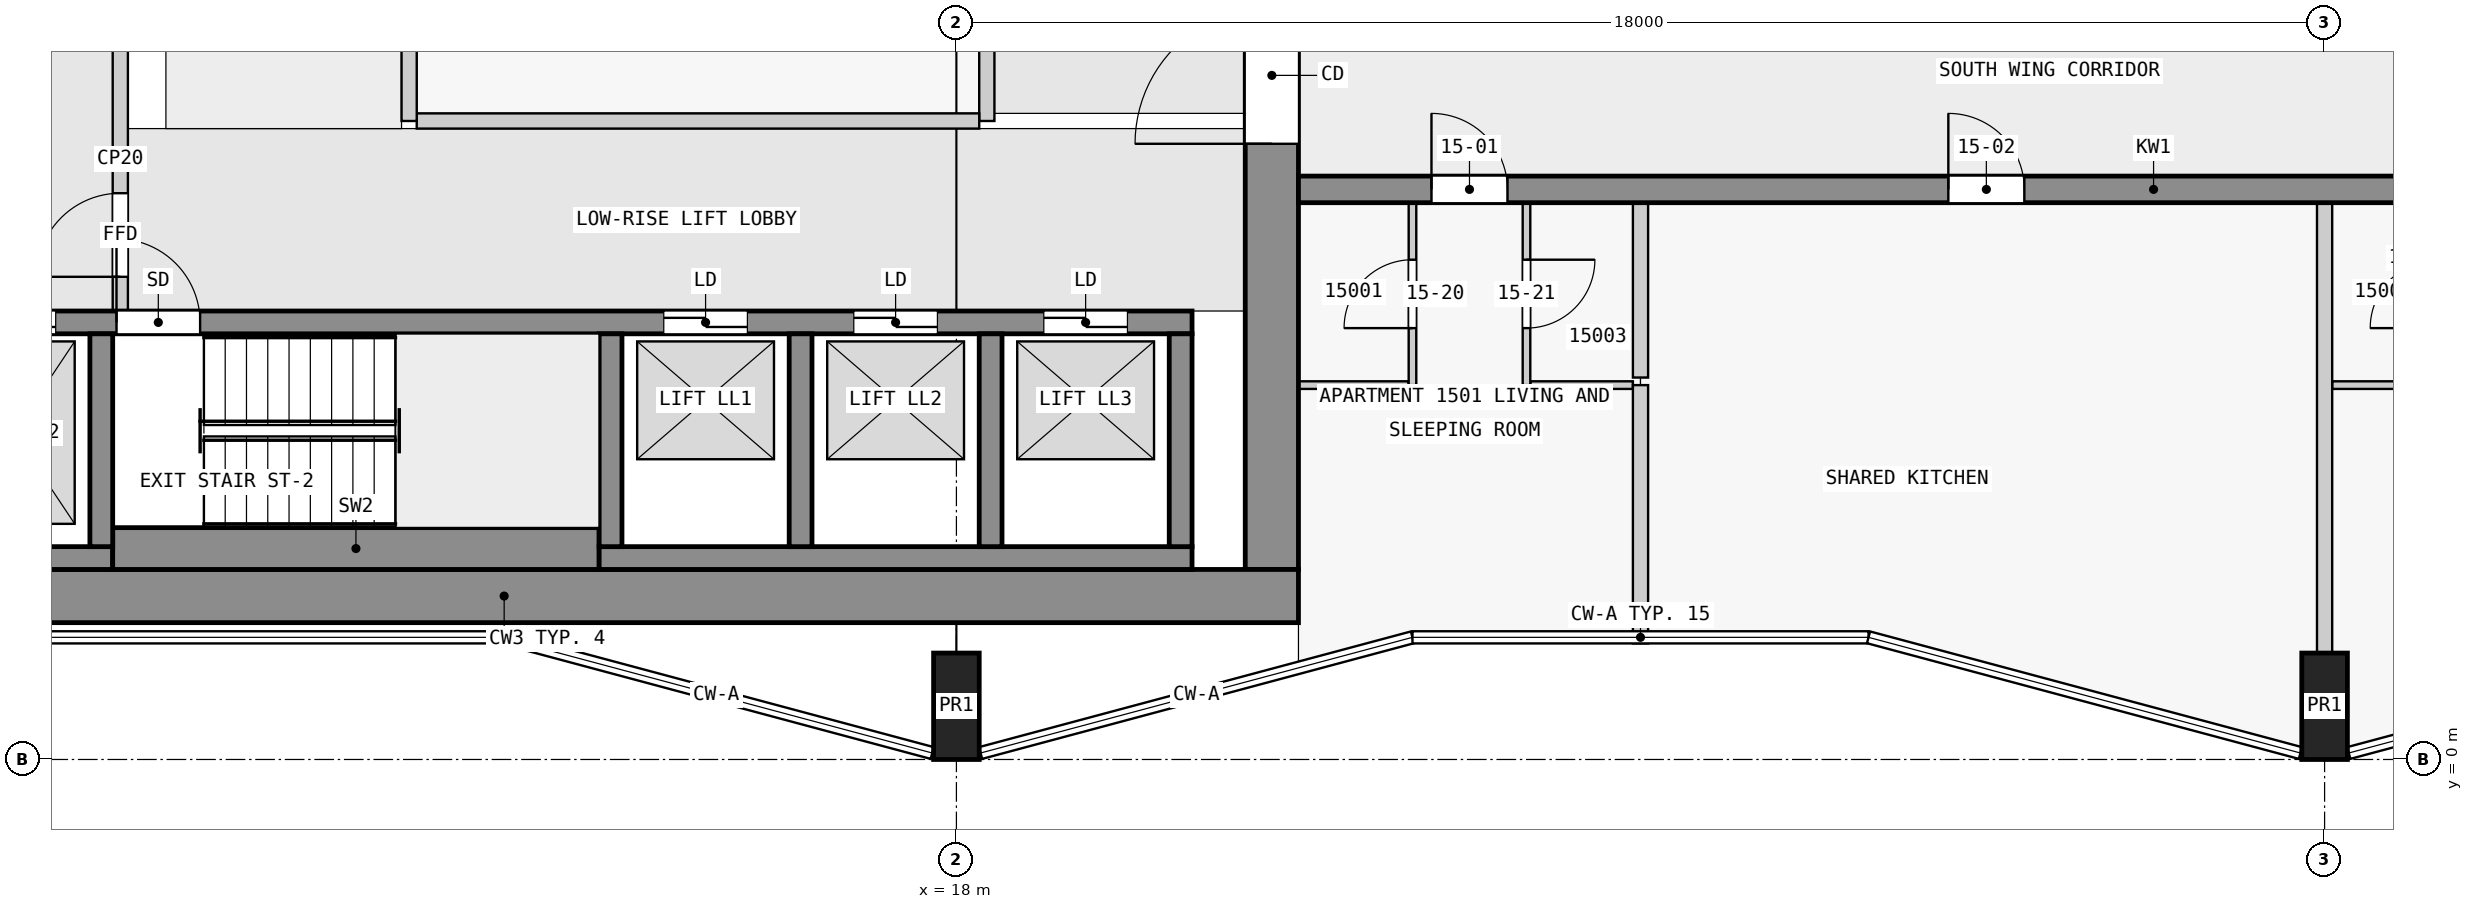
"""IFC4 building model, lengths in metres.
Left out: names, types, materials, properties, quantities, classifications, styles, units other than length and angle.
Written with IfcOpenShell. Run it as: python <this file> out.ifc"""

import sys

from ifc_helpers import new_model, si_unit, direction, frame, frame_2d, origin, origin_2d, place, context, subcontext, project, spatial, rectangle, extrude, element, fill, save


model = new_model("IFC4")
c1 = context("Model", 3, precision=1e-05, world=origin(), true_north=direction((0.0, 1.0)))
c2 = subcontext(c1, "Body", "Model", "MODEL_VIEW")
j1 = project(units=[si_unit("LENGTHUNIT", "METRE"), si_unit("PLANEANGLEUNIT", "RADIAN")], contexts=[c1])
p1 = place(None, origin())
s1 = spatial("IfcSite", under=j1, at=p1, CompositionType="ELEMENT")
p2 = place(p1, origin())
s2 = spatial("IfcBuilding", under=s1, at=p2, CompositionType="ELEMENT")
p3 = place(p2, frame((0.0, 0.0, 61.8)))
s3 = spatial("IfcBuildingStorey", under=s2, at=p3, CompositionType="ELEMENT", Elevation=61.8)
for number, where, z_axis, x_axis in (
    (1, (18.0, 0.7, 0.0), (0.0, 0.0, 1.0), (1.0, 0.0, 0.0)),
    (2, (36.0, 0.7, 0.0), (0.0, 0.0, 1.0), (1.0, 0.0, 0.0)),
):
    element("IfcColumn", number, at=place(p3, frame(where, z_axis=z_axis, x_axis=x_axis)), inside=s3, PredefinedType="COLUMN", context=c2, shape_type="SweptSolid", body=[
        extrude(rectangle(XDim=0.6, YDim=1.4, at=origin_2d()), origin(), (0.0, 0.0, 1.0), 3.5),
    ])
p4 = place(p3, frame((1.6, 2.15, 0.0), z_axis=(0.0, 0.0, 1.0), x_axis=(1.0, 0.0, 0.0)))
e3 = element("IfcWall", 3, at=p4, inside=s3, PredefinedType="SHEAR", context=c2, shape_type="SweptSolid", body=[
    extrude(rectangle(XDim=20.9, YDim=0.7, at=frame_2d((10.45, 0.0))), origin(), (0.0, 0.0, 1.0), 3.25),
])
p5 = place(p3, frame((22.15, 2.5, 0.0), z_axis=(0.0, 0.0, 1.0), x_axis=(0.0, 1.0, 0.0)))
e4 = element("IfcWall", 4, at=p5, inside=s3, PredefinedType="SHEAR", context=c2, shape_type="SweptSolid", body=[
    extrude(rectangle(XDim=14.8, YDim=0.7, at=frame_2d((7.4, 0.0))), origin(), (0.0, 0.0, 1.0), 3.25),
])
p6 = place(p5, frame((5.6, 0.0, 0.0)))
e5 = element("IfcOpeningElement", 5, at=p6, cuts=e4, PredefinedType="OPENING", context=c2, shape_type="SweptSolid", body=[
    extrude(rectangle(XDim=1.8, YDim=2.1, at=frame_2d((0.9, 1.05))), frame((0.0, 0.36, 0.0), z_axis=(0.0, -1.0, 0.0), x_axis=(1.0, 0.0, 0.0)), (0.0, 0.0, 1.0), 0.72),
])
p7 = place(p3, frame((2.3, 2.65, 0.0), z_axis=(0.0, 0.0, 1.0), x_axis=(1.0, 0.0, 0.0)))
e6 = element("IfcWall", 6, at=p7, inside=s3, PredefinedType="SHEAR", context=c2, shape_type="SweptSolid", body=[
    extrude(rectangle(XDim=4.6, YDim=0.3, at=frame_2d((2.3, 0.0))), origin(), (0.0, 0.0, 1.0), 3.25),
])
p8 = place(p3, frame((6.9, 2.775, 0.0), z_axis=(0.0, 0.0, 1.0), x_axis=(1.0, 0.0, 0.0)))
e7 = element("IfcWall", 7, at=p8, inside=s3, PredefinedType="SHEAR", context=c2, shape_type="SweptSolid", body=[
    extrude(rectangle(XDim=6.4, YDim=0.55, at=frame_2d((3.2, 0.0))), origin(), (0.0, 0.0, 1.0), 3.25),
])
p9 = place(p3, frame((13.3, 2.65, 0.0), z_axis=(0.0, 0.0, 1.0), x_axis=(1.0, 0.0, 0.0)))
e8 = element("IfcWall", 8, at=p9, inside=s3, PredefinedType="SHEAR", context=c2, shape_type="SweptSolid", body=[
    extrude(rectangle(XDim=7.8, YDim=0.3, at=frame_2d((3.9, 0.0))), origin(), (0.0, 0.0, 1.0), 3.25),
])
for number, where, z_axis, x_axis in (
    (9, (6.75, 2.8, 0.0), (0.0, 0.0, 1.0), (0.0, 1.0, 0.0)),
    (10, (13.45, 2.8, 0.0), (0.0, 0.0, 1.0), (0.0, 1.0, 0.0)),
    (11, (15.95, 2.8, 0.0), (0.0, 0.0, 1.0), (0.0, 1.0, 0.0)),
    (12, (18.45, 2.8, 0.0), (0.0, 0.0, 1.0), (0.0, 1.0, 0.0)),
    (13, (20.95, 2.8, 0.0), (0.0, 0.0, 1.0), (0.0, 1.0, 0.0)),
):
    element("IfcWall", number, at=place(p3, frame(where, z_axis=z_axis, x_axis=x_axis)), inside=s3, PredefinedType="SHEAR", context=c2, shape_type="SweptSolid", body=[
        extrude(rectangle(XDim=2.8, YDim=0.3, at=frame_2d((1.4, 0.0))), origin(), (0.0, 0.0, 1.0), 3.25),
    ])
p10 = place(p3, frame((2.3, 5.75, 0.0), z_axis=(0.0, 0.0, 1.0), x_axis=(1.0, 0.0, 0.0)))
e14 = element("IfcWall", 14, at=p10, inside=s3, PredefinedType="SHEAR", context=c2, shape_type="SweptSolid", body=[
    extrude(rectangle(XDim=18.8, YDim=0.3, at=frame_2d((9.4, 0.0))), origin(), (0.0, 0.0, 1.0), 3.25),
])
p11 = place(p10, frame((4.65, 0.0, 0.0)))
e15 = element("IfcOpeningElement", 15, at=p11, cuts=e14, PredefinedType="OPENING", context=c2, shape_type="SweptSolid", body=[
    extrude(rectangle(XDim=1.1, YDim=2.1, at=frame_2d((0.55, 1.05))), frame((0.0, 0.16, 0.0), z_axis=(0.0, -1.0, 0.0), x_axis=(1.0, 0.0, 0.0)), (0.0, 0.0, 1.0), 0.32),
])
p12 = place(p10, frame((0.45, 0.0, 0.0)))
e16 = element("IfcOpeningElement", 16, at=p12, cuts=e14, PredefinedType="OPENING", context=c2, shape_type="SweptSolid", body=[
    extrude(rectangle(XDim=1.1, YDim=2.1, at=frame_2d((0.55, 1.05))), frame((0.0, 0.16, 0.0), z_axis=(0.0, -1.0, 0.0), x_axis=(1.0, 0.0, 0.0)), (0.0, 0.0, 1.0), 0.32),
])
p13 = place(p10, frame((2.75, 0.0, 0.0)))
e17 = element("IfcOpeningElement", 17, at=p13, cuts=e14, PredefinedType="OPENING", context=c2, shape_type="SweptSolid", body=[
    extrude(rectangle(XDim=1.1, YDim=2.1, at=frame_2d((0.55, 1.05))), frame((0.0, 0.16, 0.0), z_axis=(0.0, -1.0, 0.0), x_axis=(1.0, 0.0, 0.0)), (0.0, 0.0, 1.0), 0.32),
])
p14 = place(p10, frame((11.85, 0.0, 0.0)))
e18 = element("IfcOpeningElement", 18, at=p14, cuts=e14, PredefinedType="OPENING", context=c2, shape_type="SweptSolid", body=[
    extrude(rectangle(XDim=1.1, YDim=2.1, at=frame_2d((0.55, 1.05))), frame((0.0, 0.16, 0.0), z_axis=(0.0, -1.0, 0.0), x_axis=(1.0, 0.0, 0.0)), (0.0, 0.0, 1.0), 0.32),
])
p15 = place(p10, frame((14.35, 0.0, 0.0)))
e19 = element("IfcOpeningElement", 19, at=p15, cuts=e14, PredefinedType="OPENING", context=c2, shape_type="SweptSolid", body=[
    extrude(rectangle(XDim=1.1, YDim=2.1, at=frame_2d((0.55, 1.05))), frame((0.0, 0.16, 0.0), z_axis=(0.0, -1.0, 0.0), x_axis=(1.0, 0.0, 0.0)), (0.0, 0.0, 1.0), 0.32),
])
p16 = place(p10, frame((16.85, 0.0, 0.0)))
e20 = element("IfcOpeningElement", 20, at=p16, cuts=e14, PredefinedType="OPENING", context=c2, shape_type="SweptSolid", body=[
    extrude(rectangle(XDim=1.1, YDim=2.1, at=frame_2d((0.55, 1.05))), frame((0.0, 0.16, 0.0), z_axis=(0.0, -1.0, 0.0), x_axis=(1.0, 0.0, 0.0)), (0.0, 0.0, 1.0), 0.32),
])
p17 = place(p3, frame((22.5, 7.5, 0.0), z_axis=(0.0, 0.0, 1.0), x_axis=(1.0, 0.0, 0.0)))
e21 = element("IfcWall", 21, at=p17, inside=s3, PredefinedType="SHEAR", context=c2, shape_type="SweptSolid", body=[
    extrude(rectangle(XDim=22.5, YDim=0.35, at=frame_2d((11.25, 0.0))), origin(), (0.0, 0.0, 1.0), 3.25),
])
p18 = place(p17, frame((1.75, 0.0, 0.0)))
e22 = element("IfcOpeningElement", 22, at=p18, cuts=e21, PredefinedType="OPENING", context=c2, shape_type="SweptSolid", body=[
    extrude(rectangle(XDim=1.0, YDim=2.1, at=frame_2d((0.5, 1.05))), frame((0.0, 0.185, 0.0), z_axis=(0.0, -1.0, 0.0), x_axis=(1.0, 0.0, 0.0)), (0.0, 0.0, 1.0), 0.37),
])
p19 = place(p17, frame((8.55, 0.0, 0.0)))
e23 = element("IfcOpeningElement", 23, at=p19, cuts=e21, PredefinedType="OPENING", context=c2, shape_type="SweptSolid", body=[
    extrude(rectangle(XDim=1.0, YDim=2.1, at=frame_2d((0.5, 1.05))), frame((0.0, 0.185, 0.0), z_axis=(0.0, -1.0, 0.0), x_axis=(1.0, 0.0, 0.0)), (0.0, 0.0, 1.0), 0.37),
])
p20 = place(p17, frame((15.25, 0.0, 0.0)))
e24 = element("IfcOpeningElement", 24, at=p20, cuts=e21, PredefinedType="OPENING", context=c2, shape_type="SweptSolid", body=[
    extrude(rectangle(XDim=1.0, YDim=2.1, at=frame_2d((0.5, 1.05))), frame((0.0, 0.185, 0.0), z_axis=(0.0, -1.0, 0.0), x_axis=(1.0, 0.0, 0.0)), (0.0, 0.0, 1.0), 0.37),
])
p21 = place(p17, frame((18.75, 0.0, 0.0)))
e25 = element("IfcOpeningElement", 25, at=p21, cuts=e21, PredefinedType="OPENING", context=c2, shape_type="SweptSolid", body=[
    extrude(rectangle(XDim=0.9, YDim=2.1, at=frame_2d((0.45, 1.05))), frame((0.0, 0.185, 0.0), z_axis=(0.0, -1.0, 0.0), x_axis=(1.0, 0.0, 0.0)), (0.0, 0.0, 1.0), 0.37),
])
p22 = place(p17, frame((20.95, 0.0, 0.0)))
e26 = element("IfcOpeningElement", 26, at=p22, cuts=e21, PredefinedType="OPENING", context=c2, shape_type="SweptSolid", body=[
    extrude(rectangle(XDim=1.0, YDim=2.1, at=frame_2d((0.5, 1.05))), frame((0.0, 0.185, 0.0), z_axis=(0.0, -1.0, 0.0), x_axis=(1.0, 0.0, 0.0)), (0.0, 0.0, 1.0), 0.37),
])
p23 = place(p3, frame((7.0, 5.9, 0.0), z_axis=(0.0, 0.0, 1.0), x_axis=(0.0, 1.0, 0.0)))
e27 = element("IfcWall", 27, at=p23, inside=s3, PredefinedType="PARTITIONING", context=c2, shape_type="SweptSolid", body=[
    extrude(rectangle(XDim=4.0, YDim=0.2, at=frame_2d((2.0, 0.0))), origin(), (0.0, 0.0, 1.0), 3.25),
])
p24 = place(p23, frame((0.45, 0.0, 0.0)))
e28 = element("IfcOpeningElement", 28, at=p24, cuts=e27, PredefinedType="OPENING", context=c2, shape_type="SweptSolid", body=[
    extrude(rectangle(XDim=1.1, YDim=2.1, at=frame_2d((0.55, 1.05))), frame((0.0, 0.11, 0.0), z_axis=(0.0, -1.0, 0.0), x_axis=(1.0, 0.0, 0.0)), (0.0, 0.0, 1.0), 0.22),
])
p25 = place(p3, frame((10.8, 8.4, 0.0), z_axis=(0.0, 0.0, 1.0), x_axis=(0.0, 1.0, 0.0)))
e29 = element("IfcWall", 29, at=p25, inside=s3, PredefinedType="PARTITIONING", context=c2, shape_type="SweptSolid", body=[
    extrude(rectangle(XDim=6.2, YDim=0.2, at=frame_2d((3.1, 0.0))), origin(), (0.0, 0.0, 1.0), 3.25),
])
p26 = place(p3, frame((10.9, 8.4, 0.0), z_axis=(0.0, 0.0, 1.0), x_axis=(1.0, 0.0, 0.0)))
e30 = element("IfcWall", 30, at=p26, inside=s3, PredefinedType="PARTITIONING", context=c2, shape_type="SweptSolid", body=[
    extrude(rectangle(XDim=7.4, YDim=0.2, at=frame_2d((3.7, 0.0))), origin(), (0.0, 0.0, 1.0), 3.25),
])
p27 = place(p3, frame((18.4, 8.4, 0.0), z_axis=(0.0, 0.0, 1.0), x_axis=(0.0, 1.0, 0.0)))
e31 = element("IfcWall", 31, at=p27, inside=s3, PredefinedType="PARTITIONING", context=c2, shape_type="SweptSolid", body=[
    extrude(rectangle(XDim=6.2, YDim=0.2, at=frame_2d((3.1, 0.0))), origin(), (0.0, 0.0, 1.0), 3.25),
])
p28 = place(p27, frame((0.95, 0.0, 0.0)))
e32 = element("IfcOpeningElement", 32, at=p28, cuts=e31, PredefinedType="OPENING", context=c2, shape_type="SweptSolid", body=[
    extrude(rectangle(XDim=0.9, YDim=2.1, at=frame_2d((0.45, 1.05))), frame((0.0, 0.11, 0.0), z_axis=(0.0, -1.0, 0.0), x_axis=(1.0, 0.0, 0.0)), (0.0, 0.0, 1.0), 0.22),
])
p29 = place(p27, frame((4.05, 0.0, 0.0)))
e33 = element("IfcOpeningElement", 33, at=p29, cuts=e31, PredefinedType="OPENING", context=c2, shape_type="SweptSolid", body=[
    extrude(rectangle(XDim=0.9, YDim=2.1, at=frame_2d((0.45, 1.05))), frame((0.0, 0.11, 0.0), z_axis=(0.0, -1.0, 0.0), x_axis=(1.0, 0.0, 0.0)), (0.0, 0.0, 1.0), 0.22),
])
p30 = place(p3, frame((22.5, 4.925, 0.0), z_axis=(0.0, 0.0, 1.0), x_axis=(1.0, 0.0, 0.0)))
e34 = element("IfcWall", 34, at=p30, inside=s3, PredefinedType="PARTITIONING", context=c2, shape_type="SweptSolid", body=[
    extrude(rectangle(XDim=1.45, YDim=0.1, at=frame_2d((0.725, 0.0))), origin(), (0.0, 0.0, 1.0), 3.25),
])
for number, where, z_axis, x_axis in (
    (35, (25.55, 4.925, 0.0), (0.0, 0.0, 1.0), (1.0, 0.0, 0.0)),
    (36, (36.1, 4.925, 0.0), (0.0, 0.0, 1.0), (1.0, 0.0, 0.0)),
):
    element("IfcWall", number, at=place(p3, frame(where, z_axis=z_axis, x_axis=x_axis)), inside=s3, PredefinedType="PARTITIONING", context=c2, shape_type="SweptSolid", body=[
        extrude(rectangle(XDim=1.35, YDim=0.1, at=frame_2d((0.675, 0.0))), origin(), (0.0, 0.0, 1.0), 3.25),
    ])
p31 = place(p3, frame((24.0, 4.925, 0.0), z_axis=(0.0, 0.0, 1.0), x_axis=(0.0, 1.0, 0.0)))
e37 = element("IfcWall", 37, at=p31, inside=s3, PredefinedType="PARTITIONING", context=c2, shape_type="SweptSolid", body=[
    extrude(rectangle(XDim=2.4, YDim=0.1, at=frame_2d((1.2, 0.0))), origin(), (0.0, 0.0, 1.0), 3.25),
])
p32 = place(p31, frame((0.75, 0.0, 0.0)))
e38 = element("IfcOpeningElement", 38, at=p32, cuts=e37, PredefinedType="OPENING", context=c2, shape_type="SweptSolid", body=[
    extrude(rectangle(XDim=0.9, YDim=2.1, at=frame_2d((0.45, 1.05))), frame((0.0, 0.06, 0.0), z_axis=(0.0, -1.0, 0.0), x_axis=(1.0, 0.0, 0.0)), (0.0, 0.0, 1.0), 0.12),
])
p33 = place(p3, frame((25.5, 7.325, 0.0), z_axis=(0.0, 0.0, 1.0), x_axis=(0.0, -1.0, 0.0)))
e39 = element("IfcWall", 39, at=p33, inside=s3, PredefinedType="PARTITIONING", context=c2, shape_type="SweptSolid", body=[
    extrude(rectangle(XDim=2.4, YDim=0.1, at=frame_2d((1.2, 0.0))), origin(), (0.0, 0.0, 1.0), 3.25),
])
p34 = place(p33, frame((0.75, 0.0, 0.0)))
e40 = element("IfcOpeningElement", 40, at=p34, cuts=e39, PredefinedType="OPENING", context=c2, shape_type="SweptSolid", body=[
    extrude(rectangle(XDim=0.9, YDim=2.1, at=frame_2d((0.45, 1.05))), frame((0.0, 0.06, 0.0), z_axis=(0.0, -1.0, 0.0), x_axis=(1.0, 0.0, 0.0)), (0.0, 0.0, 1.0), 0.12),
])
p35 = place(p3, frame((27.0, 4.925, 0.0), z_axis=(0.0, 0.0, 1.0), x_axis=(0.0, -1.0, 0.0)))
e41 = element("IfcWall", 41, at=p35, inside=s3, PredefinedType="PARTITIONING", context=c2, shape_type="SweptSolid", body=[
    extrude(rectangle(XDim=3.398, YDim=0.2, at=frame_2d((1.699, 0.0))), origin(), (0.0, 0.0, 1.0), 3.25),
])
p36 = place(p3, frame((27.0, 5.025, 0.0), z_axis=(0.0, 0.0, 1.0), x_axis=(0.0, 1.0, 0.0)))
e42 = element("IfcWall", 42, at=p36, inside=s3, PredefinedType="PARTITIONING", context=c2, shape_type="SweptSolid", body=[
    extrude(rectangle(XDim=2.3, YDim=0.2, at=frame_2d((1.15, 0.0))), origin(), (0.0, 0.0, 1.0), 3.25),
])
p37 = place(p3, frame((36.0, 1.4, 0.0), z_axis=(0.0, 0.0, 1.0), x_axis=(0.0, 1.0, 0.0)))
e43 = element("IfcWall", 43, at=p37, inside=s3, PredefinedType="PARTITIONING", context=c2, shape_type="SweptSolid", body=[
    extrude(rectangle(XDim=5.925, YDim=0.2, at=frame_2d((2.962, 0.0))), origin(), (0.0, 0.0, 1.0), 3.25),
])
p38 = place(p24, origin())
e44 = element("IfcDoor", 44, at=p38, inside=s3, OperationType="SINGLE_SWING_LEFT", PredefinedType="DOOR", context=c2, shape_type="SweptSolid", body=[
    extrude(rectangle(XDim=1.1, YDim=2.1, at=frame_2d((0.55, 1.05))), frame((0.0, 0.025, 0.0), z_axis=(0.0, -1.0, 0.0), x_axis=(1.0, 0.0, 0.0)), (0.0, 0.0, 1.0), 0.05),
])
fill(e28, e44)
p39 = place(p11, origin())
e45 = element("IfcDoor", 45, at=p39, inside=s3, OperationType="SINGLE_SWING_LEFT", PredefinedType="DOOR", context=c2, shape_type="SweptSolid", body=[
    extrude(rectangle(XDim=1.1, YDim=2.1, at=frame_2d((0.55, 1.05))), frame((0.0, 0.025, 0.0), z_axis=(0.0, -1.0, 0.0), x_axis=(1.0, 0.0, 0.0)), (0.0, 0.0, 1.0), 0.05),
])
fill(e15, e45)
p40 = place(p13, origin())
e46 = element("IfcDoor", 46, at=p40, inside=s3, OperationType="DOUBLE_DOOR_SLIDING", PredefinedType="DOOR", context=c2, shape_type="SweptSolid", body=[
    extrude(rectangle(XDim=1.1, YDim=2.1, at=frame_2d((0.55, 1.05))), frame((0.0, 0.025, 0.0), z_axis=(0.0, -1.0, 0.0), x_axis=(1.0, 0.0, 0.0)), (0.0, 0.0, 1.0), 0.05),
])
fill(e17, e46)
p41 = place(p14, origin())
e47 = element("IfcDoor", 47, at=p41, inside=s3, OperationType="DOUBLE_DOOR_SLIDING", PredefinedType="DOOR", context=c2, shape_type="SweptSolid", body=[
    extrude(rectangle(XDim=1.1, YDim=2.1, at=frame_2d((0.55, 1.05))), frame((0.0, 0.025, 0.0), z_axis=(0.0, -1.0, 0.0), x_axis=(1.0, 0.0, 0.0)), (0.0, 0.0, 1.0), 0.05),
])
fill(e18, e47)
p42 = place(p15, origin())
e48 = element("IfcDoor", 48, at=p42, inside=s3, OperationType="DOUBLE_DOOR_SLIDING", PredefinedType="DOOR", context=c2, shape_type="SweptSolid", body=[
    extrude(rectangle(XDim=1.1, YDim=2.1, at=frame_2d((0.55, 1.05))), frame((0.0, 0.025, 0.0), z_axis=(0.0, -1.0, 0.0), x_axis=(1.0, 0.0, 0.0)), (0.0, 0.0, 1.0), 0.05),
])
fill(e19, e48)
p43 = place(p16, origin())
e49 = element("IfcDoor", 49, at=p43, inside=s3, OperationType="DOUBLE_DOOR_SLIDING", PredefinedType="DOOR", context=c2, shape_type="SweptSolid", body=[
    extrude(rectangle(XDim=1.1, YDim=2.1, at=frame_2d((0.55, 1.05))), frame((0.0, 0.025, 0.0), z_axis=(0.0, -1.0, 0.0), x_axis=(1.0, 0.0, 0.0)), (0.0, 0.0, 1.0), 0.05),
])
fill(e20, e49)
p44 = place(p6, origin())
e50 = element("IfcDoor", 50, at=p44, inside=s3, OperationType="DOUBLE_DOOR_SINGLE_SWING", PredefinedType="DOOR", context=c2, shape_type="SweptSolid", body=[
    extrude(rectangle(XDim=1.8, YDim=2.1, at=frame_2d((0.9, 1.05))), frame((0.0, 0.025, 0.0), z_axis=(0.0, -1.0, 0.0), x_axis=(1.0, 0.0, 0.0)), (0.0, 0.0, 1.0), 0.05),
])
fill(e5, e50)
p45 = place(p18, origin())
e51 = element("IfcDoor", 51, at=p45, inside=s3, OperationType="SINGLE_SWING_LEFT", PredefinedType="DOOR", context=c2, shape_type="SweptSolid", body=[
    extrude(rectangle(XDim=1.0, YDim=2.1, at=frame_2d((0.5, 1.05))), frame((0.0, 0.025, 0.0), z_axis=(0.0, -1.0, 0.0), x_axis=(1.0, 0.0, 0.0)), (0.0, 0.0, 1.0), 0.05),
])
fill(e22, e51)
p46 = place(p19, origin())
e52 = element("IfcDoor", 52, at=p46, inside=s3, OperationType="SINGLE_SWING_LEFT", PredefinedType="DOOR", context=c2, shape_type="SweptSolid", body=[
    extrude(rectangle(XDim=1.0, YDim=2.1, at=frame_2d((0.5, 1.05))), frame((0.0, 0.025, 0.0), z_axis=(0.0, -1.0, 0.0), x_axis=(1.0, 0.0, 0.0)), (0.0, 0.0, 1.0), 0.05),
])
fill(e23, e52)
p47 = place(p32, origin())
e53 = element("IfcDoor", 53, at=p47, inside=s3, OperationType="SINGLE_SWING_LEFT", PredefinedType="DOOR", context=c2, shape_type="SweptSolid", body=[
    extrude(rectangle(XDim=0.9, YDim=2.1, at=frame_2d((0.45, 1.05))), frame((0.0, 0.025, 0.0), z_axis=(0.0, -1.0, 0.0), x_axis=(1.0, 0.0, 0.0)), (0.0, 0.0, 1.0), 0.05),
])
fill(e38, e53)
p48 = place(p34, origin())
e54 = element("IfcDoor", 54, at=p48, inside=s3, OperationType="SINGLE_SWING_LEFT", PredefinedType="DOOR", context=c2, shape_type="SweptSolid", body=[
    extrude(rectangle(XDim=0.9, YDim=2.1, at=frame_2d((0.45, 1.05))), frame((0.0, 0.025, 0.0), z_axis=(0.0, -1.0, 0.0), x_axis=(1.0, 0.0, 0.0)), (0.0, 0.0, 1.0), 0.05),
])
fill(e40, e54)
save(model, sys.argv[1])
